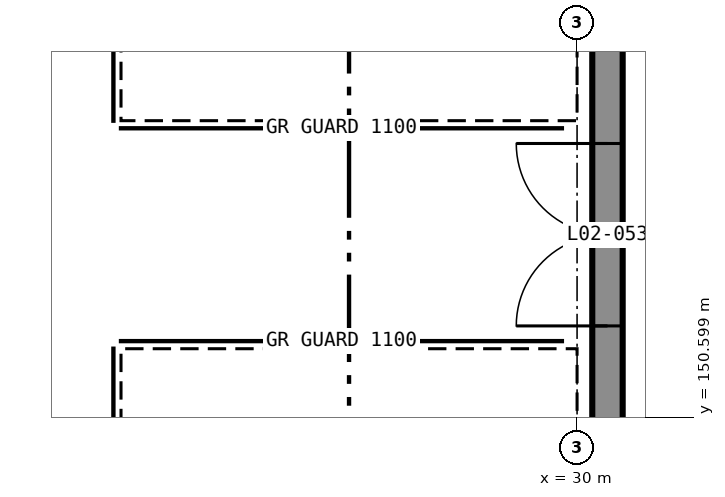
"""IFC4 building model, lengths in metres.
Left out: names, types, materials, properties, quantities, classifications, styles, units other than length and angle.
Written with IfcOpenShell. Run it as: python <this file> out.ifc"""

import sys

from ifc_helpers import new_model, si_unit, direction, frame, frame_2d, origin, place, context, subcontext, project, spatial, rectangle, extrude, element, fill, save


model = new_model("IFC4")
c1 = context("Model", 3, precision=1e-05, world=origin(), true_north=direction((0.0, 1.0)))
c2 = subcontext(c1, "Body", "Model", "MODEL_VIEW")
j1 = project(units=[si_unit("LENGTHUNIT", "METRE"), si_unit("PLANEANGLEUNIT", "RADIAN")], contexts=[c1])
p1 = place(None, origin())
s1 = spatial("IfcSite", under=j1, at=p1, CompositionType="ELEMENT")
p2 = place(p1, origin())
s2 = spatial("IfcBuilding", under=s1, at=p2, CompositionType="ELEMENT")
p3 = place(p2, frame((0.0, 0.0, 12.0)))
s3 = spatial("IfcBuildingStorey", under=s2, at=p3, CompositionType="ELEMENT", Elevation=12.0)
p4 = place(p3, frame((30.4, 150.5, 0.0), z_axis=(0.0, 0.0, 1.0), x_axis=(0.0, 1.0, 0.0)))
e1 = element("IfcWall", 1, at=p4, inside=s3, PredefinedType="SOLIDWALL", context=c2, shape_type="SweptSolid", body=[
    extrude(rectangle(XDim=11.0, YDim=0.4, at=frame_2d((5.5, 0.0))), origin(), (0.0, 0.0, 1.0), 5.0),
])
p5 = place(p4, frame((1.3, 0.0, 0.0)))
e2 = element("IfcOpeningElement", 2, at=p5, cuts=e1, PredefinedType="OPENING", context=c2, shape_type="SweptSolid", body=[
    extrude(rectangle(XDim=2.4, YDim=2.4, at=frame_2d((1.2, 1.2))), frame((0.0, 0.21, 0.0), z_axis=(0.0, -1.0, 0.0), x_axis=(1.0, 0.0, 0.0)), (0.0, 0.0, 1.0), 0.42),
])
p6 = place(p5, origin())
e3 = element("IfcDoor", 3, at=p6, inside=s3, OperationType="DOUBLE_DOOR_SINGLE_SWING", PredefinedType="DOOR", context=c2, shape_type="SweptSolid", body=[
    extrude(rectangle(XDim=2.4, YDim=2.4, at=frame_2d((1.2, 1.2))), frame((0.0, 0.025, 0.0), z_axis=(0.0, -1.0, 0.0), x_axis=(1.0, 0.0, 0.0)), (0.0, 0.0, 1.0), 0.05),
])
fill(e2, e3)
save(model, sys.argv[1])
